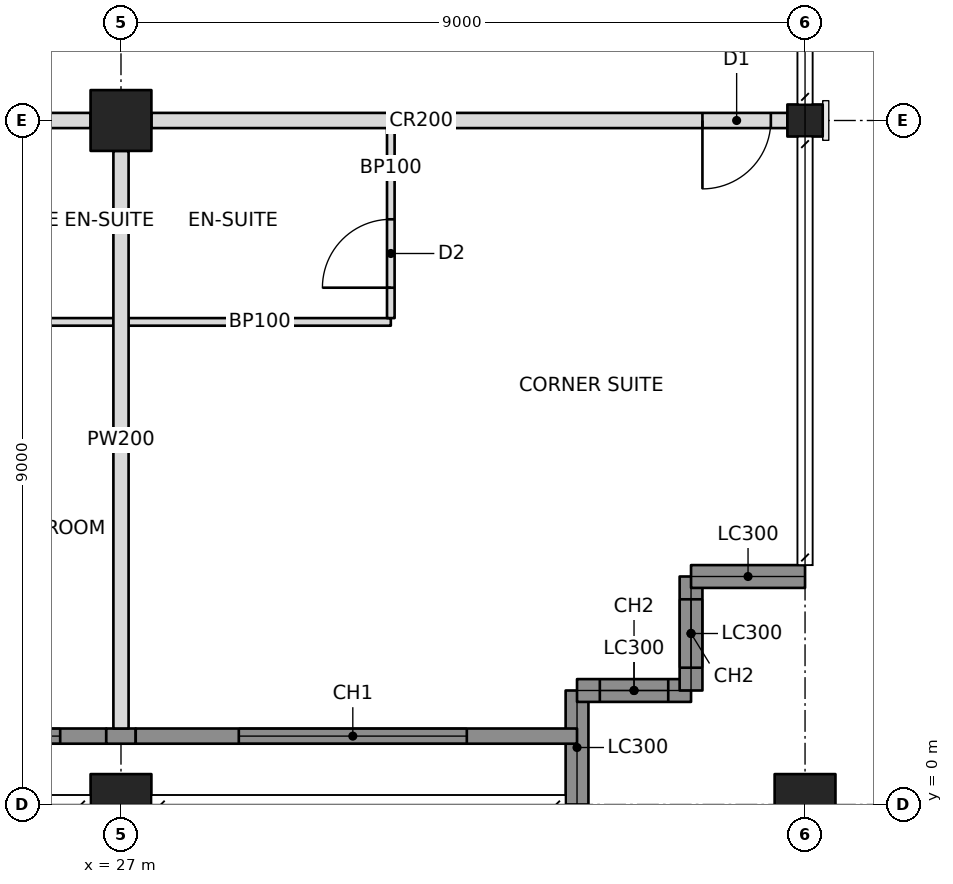
"""IFC4 building model, lengths in metres.
Left out: names, types, materials, properties, quantities, classifications, styles, units other than length and angle.
Written with IfcOpenShell. Run it as: python <this file> out.ifc"""

import sys

from ifc_helpers import new_model, si_unit, direction, frame, frame_2d, origin, origin_2d, place, context, subcontext, project, spatial, rectangle, hollow_rectangle, i_section, extrude, element, fill, save


model = new_model("IFC4")
c1 = context("Model", 3, precision=1e-05, world=origin(), true_north=direction((0.0, 1.0)))
c2 = subcontext(c1, "Body", "Model", "MODEL_VIEW")
j1 = project(units=[si_unit("LENGTHUNIT", "METRE"), si_unit("PLANEANGLEUNIT", "RADIAN")], contexts=[c1])
p1 = place(None, origin())
s1 = spatial("IfcSite", under=j1, at=p1, CompositionType="ELEMENT")
p2 = place(p1, origin())
s2 = spatial("IfcBuilding", under=s1, at=p2, CompositionType="ELEMENT")
p3 = place(p2, frame((0.0, 0.0, 233.8)))
s3 = spatial("IfcBuildingStorey", under=s2, at=p3, CompositionType="ELEMENT", Elevation=233.8)
p4 = place(p3, frame((27.0, 0.0, 0.0), z_axis=(0.0, 0.0, 1.0), x_axis=(1.0, 0.0, 0.0)))
e1 = element("IfcColumn", 1, at=p4, inside=s3, PredefinedType="COLUMN", context=c2, shape_type="SweptSolid", body=[
    extrude(hollow_rectangle(XDim=0.8, YDim=0.8, WallThickness=0.05, at=origin_2d()), origin(), (0.0, 0.0, 1.0), 3.6),
])
p5 = place(p3, frame((27.0, 9.0, 0.0), z_axis=(0.0, 0.0, 1.0), x_axis=(1.0, 0.0, 0.0)))
e2 = element("IfcColumn", 2, at=p5, inside=s3, PredefinedType="COLUMN", context=c2, shape_type="SweptSolid", body=[
    extrude(hollow_rectangle(XDim=0.8, YDim=0.8, WallThickness=0.04, at=origin_2d()), origin(), (0.0, 0.0, 1.0), 3.6),
])
p6 = place(p3, frame((36.0, 0.0, 0.0), z_axis=(0.0, 0.0, 1.0), x_axis=(1.0, 0.0, 0.0)))
e3 = element("IfcColumn", 3, at=p6, inside=s3, PredefinedType="COLUMN", context=c2, shape_type="SweptSolid", body=[
    extrude(hollow_rectangle(XDim=0.8, YDim=0.8, WallThickness=0.05, at=origin_2d()), origin(), (0.0, 0.0, 1.0), 3.6),
])
p7 = place(p3, frame((36.0, 9.0, 0.0), z_axis=(0.0, 0.0, 1.0), x_axis=(0.0, 1.0, 0.0)))
e4 = element("IfcColumn", 4, at=p7, inside=s3, PredefinedType="COLUMN", context=c2, shape_type="SweptSolid", body=[
    extrude(i_section(OverallWidth=0.422, OverallDepth=0.465, WebThickness=0.045, FlangeThickness=0.073, at=origin_2d()), origin(), (0.0, 0.0, 1.0), 3.6),
])
p8 = place(p3, frame((33.0, 0.0, 0.0), z_axis=(0.0, 0.0, 1.0), x_axis=(0.0, 1.0, 0.0)))
e5 = element("IfcWall", 5, at=p8, inside=s3, PredefinedType="SOLIDWALL", context=c2, shape_type="SweptSolid", body=[
    extrude(rectangle(XDim=1.5, YDim=0.3, at=frame_2d((0.75, 0.0))), origin(), (0.0, 0.0, 1.0), 2.62),
])
p9 = place(p3, frame((33.0, 1.5, 0.0), z_axis=(0.0, 0.0, 1.0), x_axis=(1.0, 0.0, 0.0)))
e6 = element("IfcWall", 6, at=p9, inside=s3, PredefinedType="SOLIDWALL", context=c2, shape_type="SweptSolid", body=[
    extrude(rectangle(XDim=1.5, YDim=0.3, at=frame_2d((0.75, 0.0))), origin(), (0.0, 0.0, 1.0), 3.4),
])
p10 = place(p9, frame((0.3, 0.0, 0.6)))
e7 = element("IfcOpeningElement", 7, at=p10, cuts=e6, PredefinedType="OPENING", context=c2, shape_type="SweptSolid", body=[
    extrude(rectangle(XDim=0.9, YDim=2.2, at=frame_2d((0.45, 1.1))), frame((0.0, 0.16, 0.0), z_axis=(0.0, -1.0, 0.0), x_axis=(1.0, 0.0, 0.0)), (0.0, 0.0, 1.0), 0.32),
])
p11 = place(p3, frame((34.5, 1.5, 0.0), z_axis=(0.0, 0.0, 1.0), x_axis=(0.0, 1.0, 0.0)))
e8 = element("IfcWall", 8, at=p11, inside=s3, PredefinedType="SOLIDWALL", context=c2, shape_type="SweptSolid", body=[
    extrude(rectangle(XDim=1.5, YDim=0.3, at=frame_2d((0.75, 0.0))), origin(), (0.0, 0.0, 1.0), 3.4),
])
p12 = place(p11, frame((0.3, 0.0, 0.6)))
e9 = element("IfcOpeningElement", 9, at=p12, cuts=e8, PredefinedType="OPENING", context=c2, shape_type="SweptSolid", body=[
    extrude(rectangle(XDim=0.9, YDim=2.2, at=frame_2d((0.45, 1.1))), frame((0.0, 0.16, 0.0), z_axis=(0.0, -1.0, 0.0), x_axis=(1.0, 0.0, 0.0)), (0.0, 0.0, 1.0), 0.32),
])
p13 = place(p3, frame((34.5, 3.0, 0.0), z_axis=(0.0, 0.0, 1.0), x_axis=(1.0, 0.0, 0.0)))
e10 = element("IfcWall", 10, at=p13, inside=s3, PredefinedType="SOLIDWALL", context=c2, shape_type="SweptSolid", body=[
    extrude(rectangle(XDim=1.5, YDim=0.3, at=frame_2d((0.75, 0.0))), origin(), (0.0, 0.0, 1.0), 2.62),
])
p14 = place(p3, frame((18.4, 9.0, 0.0), z_axis=(0.0, 0.0, 1.0), x_axis=(1.0, 0.0, 0.0)))
e11 = element("IfcWall", 11, at=p14, inside=s3, PredefinedType="PARTITIONING", context=c2, shape_type="SweptSolid", body=[
    extrude(rectangle(XDim=8.2, YDim=0.2, at=frame_2d((4.1, 0.0))), origin(), (0.0, 0.0, 1.0), 2.605),
])
p15 = place(p14, frame((4.35, 0.0, 0.0)))
e12 = element("IfcOpeningElement", 12, at=p15, cuts=e11, PredefinedType="OPENING", context=c2, shape_type="SweptSolid", body=[
    extrude(rectangle(XDim=0.9, YDim=2.1, at=frame_2d((0.45, 1.05))), frame((0.0, 0.11, 0.0), z_axis=(0.0, -1.0, 0.0), x_axis=(1.0, 0.0, 0.0)), (0.0, 0.0, 1.0), 0.22),
])
p16 = place(p3, frame((27.4, 9.0, 0.0), z_axis=(0.0, 0.0, 1.0), x_axis=(1.0, 0.0, 0.0)))
e13 = element("IfcWall", 13, at=p16, inside=s3, PredefinedType="PARTITIONING", context=c2, shape_type="SweptSolid", body=[
    extrude(rectangle(XDim=8.368, YDim=0.2, at=frame_2d((4.184, 0.0))), origin(), (0.0, 0.0, 1.0), 2.605),
])
p17 = place(p16, frame((7.25, 0.0, 0.0)))
e14 = element("IfcOpeningElement", 14, at=p17, cuts=e13, PredefinedType="OPENING", context=c2, shape_type="SweptSolid", body=[
    extrude(rectangle(XDim=0.9, YDim=2.1, at=frame_2d((0.45, 1.05))), frame((0.0, 0.11, 0.0), z_axis=(0.0, -1.0, 0.0), x_axis=(1.0, 0.0, 0.0)), (0.0, 0.0, 1.0), 0.22),
])
p18 = place(p3, frame((27.0, 8.6, 0.0), z_axis=(0.0, 0.0, 1.0), x_axis=(0.0, -1.0, 0.0)))
e15 = element("IfcWall", 15, at=p18, inside=s3, PredefinedType="PARTITIONING", context=c2, shape_type="SweptSolid", body=[
    extrude(rectangle(XDim=7.6, YDim=0.2, at=frame_2d((3.8, 0.0))), origin(), (0.0, 0.0, 1.0), 2.605),
])
p19 = place(p3, frame((23.95, 6.35, 0.0), z_axis=(0.0, 0.0, 1.0), x_axis=(1.0, 0.0, 0.0)))
e16 = element("IfcWall", 16, at=p19, inside=s3, PredefinedType="PARTITIONING", context=c2, shape_type="SweptSolid", body=[
    extrude(rectangle(XDim=2.95, YDim=0.1, at=frame_2d((1.475, 0.0))), origin(), (0.0, 0.0, 1.0), 2.604),
])
p20 = place(p3, frame((27.1, 6.35, 0.0), z_axis=(0.0, 0.0, 1.0), x_axis=(1.0, 0.0, 0.0)))
e17 = element("IfcWall", 17, at=p20, inside=s3, PredefinedType="PARTITIONING", context=c2, shape_type="SweptSolid", body=[
    extrude(rectangle(XDim=3.45, YDim=0.1, at=frame_2d((1.725, 0.0))), origin(), (0.0, 0.0, 1.0), 2.604),
])
p21 = place(p3, frame((30.55, 8.9, 0.0), z_axis=(0.0, 0.0, 1.0), x_axis=(0.0, -1.0, 0.0)))
e18 = element("IfcWall", 18, at=p21, inside=s3, PredefinedType="PARTITIONING", context=c2, shape_type="SweptSolid", body=[
    extrude(rectangle(XDim=2.5, YDim=0.1, at=frame_2d((1.25, 0.0))), origin(), (0.0, 0.0, 1.0), 2.604),
])
p22 = place(p21, frame((1.2, 0.0, 0.0)))
e19 = element("IfcOpeningElement", 19, at=p22, cuts=e18, PredefinedType="OPENING", context=c2, shape_type="SweptSolid", body=[
    extrude(rectangle(XDim=0.9, YDim=2.1, at=frame_2d((0.45, 1.05))), frame((0.0, 0.06, 0.0), z_axis=(0.0, -1.0, 0.0), x_axis=(1.0, 0.0, 0.0)), (0.0, 0.0, 1.0), 0.12),
])
p23 = place(p3, frame((18.194, 0.9, 0.0), z_axis=(0.0, 0.0, 1.0), x_axis=(1.0, 0.0, 0.0)))
e20 = element("IfcWall", 20, at=p23, inside=s3, PredefinedType="SOLIDWALL", context=c2, shape_type="SweptSolid", body=[
    extrude(rectangle(XDim=8.612, YDim=0.2, at=frame_2d((4.306, 0.0))), origin(), (0.0, 0.0, 1.0), 3.4),
])
p24 = place(p23, frame((0.606, 0.0, 0.6)))
e21 = element("IfcOpeningElement", 21, at=p24, cuts=e20, PredefinedType="OPENING", context=c2, shape_type="SweptSolid", body=[
    extrude(rectangle(XDim=3.0, YDim=2.2, at=frame_2d((1.5, 1.1))), frame((0.0, 0.11, 0.0), z_axis=(0.0, -1.0, 0.0), x_axis=(1.0, 0.0, 0.0)), (0.0, 0.0, 1.0), 0.22),
])
p25 = place(p23, frame((5.006, 0.0, 0.6)))
e22 = element("IfcOpeningElement", 22, at=p25, cuts=e20, PredefinedType="OPENING", context=c2, shape_type="SweptSolid", body=[
    extrude(rectangle(XDim=3.0, YDim=2.2, at=frame_2d((1.5, 1.1))), frame((0.0, 0.11, 0.0), z_axis=(0.0, -1.0, 0.0), x_axis=(1.0, 0.0, 0.0)), (0.0, 0.0, 1.0), 0.22),
])
p26 = place(p3, frame((26.806, 0.9, 0.0), z_axis=(0.0, 0.0, 1.0), x_axis=(1.0, 0.0, 0.0)))
e23 = element("IfcWall", 23, at=p26, inside=s3, PredefinedType="SOLIDWALL", context=c2, shape_type="SweptSolid", body=[
    extrude(rectangle(XDim=0.388, YDim=0.2, at=frame_2d((0.194, 0.0))), origin(), (0.0, 0.0, 1.0), 2.604),
])
p27 = place(p3, frame((27.194, 0.9, 0.0), z_axis=(0.0, 0.0, 1.0), x_axis=(1.0, 0.0, 0.0)))
e24 = element("IfcWall", 24, at=p27, inside=s3, PredefinedType="SOLIDWALL", context=c2, shape_type="SweptSolid", body=[
    extrude(rectangle(XDim=5.806, YDim=0.2, at=frame_2d((2.903, 0.0))), origin(), (0.0, 0.0, 1.0), 3.4),
])
p28 = place(p27, frame((1.356, 0.0, 0.6)))
e25 = element("IfcOpeningElement", 25, at=p28, cuts=e24, PredefinedType="OPENING", context=c2, shape_type="SweptSolid", body=[
    extrude(rectangle(XDim=3.0, YDim=2.2, at=frame_2d((1.5, 1.1))), frame((0.0, 0.11, 0.0), z_axis=(0.0, -1.0, 0.0), x_axis=(1.0, 0.0, 0.0)), (0.0, 0.0, 1.0), 0.22),
])
p29 = place(p10, origin())
e26 = element("IfcWindow", 26, at=p29, inside=s3, PartitioningType="SINGLE_PANEL", PredefinedType="WINDOW", context=c2, shape_type="SweptSolid", body=[
    extrude(rectangle(XDim=0.9, YDim=2.2, at=frame_2d((0.45, 1.1))), frame((0.0, 0.03, 0.0), z_axis=(0.0, -1.0, 0.0), x_axis=(1.0, 0.0, 0.0)), (0.0, 0.0, 1.0), 0.06),
])
fill(e7, e26)
p30 = place(p12, origin())
e27 = element("IfcWindow", 27, at=p30, inside=s3, PartitioningType="SINGLE_PANEL", PredefinedType="WINDOW", context=c2, shape_type="SweptSolid", body=[
    extrude(rectangle(XDim=0.9, YDim=2.2, at=frame_2d((0.45, 1.1))), frame((0.0, 0.03, 0.0), z_axis=(0.0, -1.0, 0.0), x_axis=(1.0, 0.0, 0.0)), (0.0, 0.0, 1.0), 0.06),
])
fill(e9, e27)
p31 = place(p25, origin())
e28 = element("IfcWindow", 28, at=p31, inside=s3, PartitioningType="TRIPLE_PANEL_VERTICAL", PredefinedType="WINDOW", context=c2, shape_type="SweptSolid", body=[
    extrude(rectangle(XDim=3.0, YDim=2.2, at=frame_2d((1.5, 1.1))), frame((0.0, 0.03, 0.0), z_axis=(0.0, -1.0, 0.0), x_axis=(1.0, 0.0, 0.0)), (0.0, 0.0, 1.0), 0.06),
])
fill(e22, e28)
p32 = place(p28, origin())
e29 = element("IfcWindow", 29, at=p32, inside=s3, PartitioningType="TRIPLE_PANEL_VERTICAL", PredefinedType="WINDOW", context=c2, shape_type="SweptSolid", body=[
    extrude(rectangle(XDim=3.0, YDim=2.2, at=frame_2d((1.5, 1.1))), frame((0.0, 0.03, 0.0), z_axis=(0.0, -1.0, 0.0), x_axis=(1.0, 0.0, 0.0)), (0.0, 0.0, 1.0), 0.06),
])
fill(e25, e29)
p33 = place(p22, frame((0.9, 0.0, 0.0), z_axis=(0.0, 0.0, 1.0), x_axis=(-1.0, 0.0, 0.0)))
e30 = element("IfcDoor", 30, at=p33, inside=s3, OperationType="SINGLE_SWING_LEFT", PredefinedType="DOOR", context=c2, shape_type="SweptSolid", body=[
    extrude(rectangle(XDim=0.9, YDim=2.1, at=frame_2d((0.45, 1.05))), frame((0.0, 0.025, 0.0), z_axis=(0.0, -1.0, 0.0), x_axis=(1.0, 0.0, 0.0)), (0.0, 0.0, 1.0), 0.05),
])
fill(e19, e30)
p34 = place(p17, frame((0.9, 0.0, 0.0), z_axis=(0.0, 0.0, 1.0), x_axis=(-1.0, 0.0, 0.0)))
e31 = element("IfcDoor", 31, at=p34, inside=s3, OperationType="SINGLE_SWING_RIGHT", PredefinedType="DOOR", context=c2, shape_type="SweptSolid", body=[
    extrude(rectangle(XDim=0.9, YDim=2.1, at=frame_2d((0.45, 1.05))), frame((0.0, 0.025, 0.0), z_axis=(0.0, -1.0, 0.0), x_axis=(1.0, 0.0, 0.0)), (0.0, 0.0, 1.0), 0.05),
])
fill(e14, e31)
save(model, sys.argv[1])
